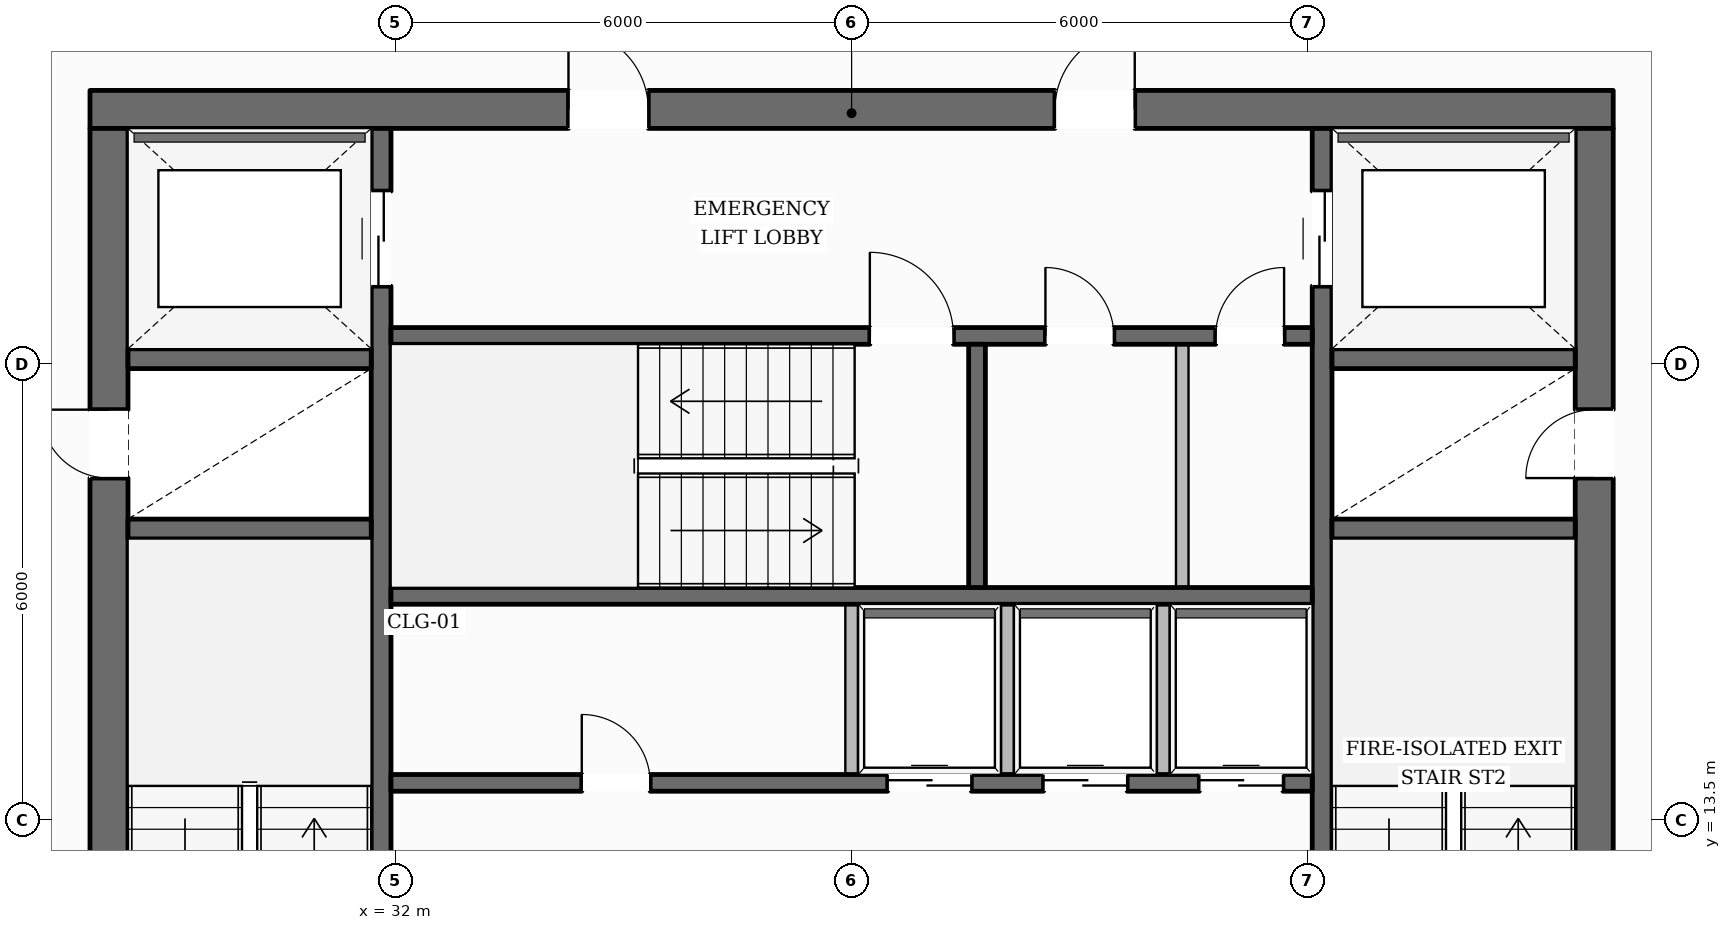
"""IFC4 building model, lengths in metres.
Left out: names, types, materials, properties, quantities, classifications, styles, units other than length and angle.
Written with IfcOpenShell. Run it as: python <this file> out.ifc"""

import sys

from ifc_helpers import new_model, si_unit, direction, frame, frame_2d, origin, place, context, subcontext, project, spatial, rectangle, extrude, element, fill, save


model = new_model("IFC4")
c1 = context("Model", 3, precision=1e-05, world=origin(), true_north=direction((0.0, 1.0)))
c2 = subcontext(c1, "Body", "Model", "MODEL_VIEW")
j1 = project(units=[si_unit("LENGTHUNIT", "METRE"), si_unit("PLANEANGLEUNIT", "RADIAN")], contexts=[c1])
p1 = place(None, origin())
s1 = spatial("IfcSite", under=j1, at=p1, CompositionType="ELEMENT")
p2 = place(p1, origin())
s2 = spatial("IfcBuilding", under=s1, at=p2, CompositionType="ELEMENT")
p3 = place(p2, frame((0.0, 0.0, 135.55)))
s3 = spatial("IfcBuildingStorey", under=s2, at=p3, CompositionType="ELEMENT", Elevation=135.55)
p4 = place(p3, frame((27.98, 22.85, 0.0), z_axis=(0.0, 0.0, 1.0), x_axis=(1.0, 0.0, 0.0)))
e1 = element("IfcWall", 1, at=p4, inside=s3, PredefinedType="SOLIDWALL", context=c2, shape_type="SweptSolid", body=[
    extrude(rectangle(XDim=20.04, YDim=0.5, at=frame_2d((10.02, 0.0))), origin(), (0.0, 0.0, 1.0), 3.6),
])
p5 = place(p4, frame((6.295, 0.0, 0.0)))
e2 = element("IfcOpeningElement", 2, at=p5, cuts=e1, PredefinedType="OPENING", context=c2, shape_type="SweptSolid", body=[
    extrude(rectangle(XDim=1.05, YDim=2.15, at=frame_2d((0.525, 1.075))), frame((0.0, 0.26, 0.0), z_axis=(0.0, -1.0, 0.0), x_axis=(1.0, 0.0, 0.0)), (0.0, 0.0, 1.0), 0.52),
])
p6 = place(p4, frame((12.695, 0.0, 0.0)))
e3 = element("IfcOpeningElement", 3, at=p6, cuts=e1, PredefinedType="OPENING", context=c2, shape_type="SweptSolid", body=[
    extrude(rectangle(XDim=1.05, YDim=2.15, at=frame_2d((0.525, 1.075))), frame((0.0, 0.26, 0.0), z_axis=(0.0, -1.0, 0.0), x_axis=(1.0, 0.0, 0.0)), (0.0, 0.0, 1.0), 0.52),
])
p7 = place(p3, frame((28.23, 9.6, 0.0), z_axis=(0.0, 0.0, 1.0), x_axis=(0.0, 1.0, 0.0)))
e4 = element("IfcWall", 4, at=p7, inside=s3, PredefinedType="SOLIDWALL", context=c2, shape_type="SweptSolid", body=[
    extrude(rectangle(XDim=13.0, YDim=0.5, at=frame_2d((6.5, 0.0))), origin(), (0.0, 0.0, 1.0), 3.6),
])
p8 = place(p7, frame((0.2, 0.0, 0.0)))
e5 = element("IfcOpeningElement", 5, at=p8, cuts=e4, PredefinedType="OPENING", context=c2, shape_type="SweptSolid", body=[
    extrude(rectangle(XDim=1.1, YDim=2.15, at=frame_2d((0.55, 1.075))), frame((0.0, 0.26, 0.0), z_axis=(0.0, -1.0, 0.0), x_axis=(1.0, 0.0, 0.0)), (0.0, 0.0, 1.0), 0.52),
])
p9 = place(p7, frame((8.4, 0.0, 0.0)))
e6 = element("IfcOpeningElement", 6, at=p9, cuts=e4, PredefinedType="OPENING", context=c2, shape_type="SweptSolid", body=[
    extrude(rectangle(XDim=0.9, YDim=2.1, at=frame_2d((0.45, 1.05))), frame((0.0, 0.26, 0.0), z_axis=(0.0, -1.0, 0.0), x_axis=(1.0, 0.0, 0.0)), (0.0, 0.0, 1.0), 0.52),
])
p10 = place(p3, frame((47.77, 9.6, 0.0), z_axis=(0.0, 0.0, 1.0), x_axis=(0.0, 1.0, 0.0)))
e7 = element("IfcWall", 7, at=p10, inside=s3, PredefinedType="SOLIDWALL", context=c2, shape_type="SweptSolid", body=[
    extrude(rectangle(XDim=13.0, YDim=0.5, at=frame_2d((6.5, 0.0))), origin(), (0.0, 0.0, 1.0), 3.6),
])
p11 = place(p10, frame((0.2, 0.0, 0.0)))
e8 = element("IfcOpeningElement", 8, at=p11, cuts=e7, PredefinedType="OPENING", context=c2, shape_type="SweptSolid", body=[
    extrude(rectangle(XDim=1.1, YDim=2.15, at=frame_2d((0.55, 1.075))), frame((0.0, 0.26, 0.0), z_axis=(0.0, -1.0, 0.0), x_axis=(1.0, 0.0, 0.0)), (0.0, 0.0, 1.0), 0.52),
])
p12 = place(p10, frame((8.4, 0.0, 0.0)))
e9 = element("IfcOpeningElement", 9, at=p12, cuts=e7, PredefinedType="OPENING", context=c2, shape_type="SweptSolid", body=[
    extrude(rectangle(XDim=0.9, YDim=2.1, at=frame_2d((0.45, 1.05))), frame((0.0, 0.26, 0.0), z_axis=(0.0, -1.0, 0.0), x_axis=(1.0, 0.0, 0.0)), (0.0, 0.0, 1.0), 0.52),
])
p13 = place(p3, frame((31.81, 9.6, 0.0), z_axis=(0.0, 0.0, 1.0), x_axis=(0.0, 1.0, 0.0)))
e10 = element("IfcWall", 10, at=p13, inside=s3, PredefinedType="SHEAR", context=c2, shape_type="SweptSolid", body=[
    extrude(rectangle(XDim=13.0, YDim=0.26, at=frame_2d((6.5, 0.0))), origin(), (0.0, 0.0, 1.0), 3.6),
])
p14 = place(p13, frame((10.925, 0.0, 0.0)))
e11 = element("IfcOpeningElement", 11, at=p14, cuts=e10, PredefinedType="OPENING", context=c2, shape_type="SweptSolid", body=[
    extrude(rectangle(XDim=1.25, YDim=2.25, at=frame_2d((0.625, 1.125))), frame((0.0, 0.14, 0.0), z_axis=(0.0, -1.0, 0.0), x_axis=(1.0, 0.0, 0.0)), (0.0, 0.0, 1.0), 0.28),
])
p15 = place(p3, frame((44.19, 9.6, 0.0), z_axis=(0.0, 0.0, 1.0), x_axis=(0.0, 1.0, 0.0)))
e12 = element("IfcWall", 12, at=p15, inside=s3, PredefinedType="SHEAR", context=c2, shape_type="SweptSolid", body=[
    extrude(rectangle(XDim=13.0, YDim=0.26, at=frame_2d((6.5, 0.0))), origin(), (0.0, 0.0, 1.0), 3.6),
])
p16 = place(p15, frame((10.925, 0.0, 0.0)))
e13 = element("IfcOpeningElement", 13, at=p16, cuts=e12, PredefinedType="OPENING", context=c2, shape_type="SweptSolid", body=[
    extrude(rectangle(XDim=1.25, YDim=2.25, at=frame_2d((0.625, 1.125))), frame((0.0, 0.14, 0.0), z_axis=(0.0, -1.0, 0.0), x_axis=(1.0, 0.0, 0.0)), (0.0, 0.0, 1.0), 0.28),
])
for number, where, z_axis, x_axis in (
    (14, (28.48, 17.33, 0.0), (0.0, 0.0, 1.0), (1.0, 0.0, 0.0)),
    (15, (28.48, 19.57, 0.0), (0.0, 0.0, 1.0), (1.0, 0.0, 0.0)),
    (16, (44.32, 17.33, 0.0), (0.0, 0.0, 1.0), (1.0, 0.0, 0.0)),
    (17, (44.32, 19.57, 0.0), (0.0, 0.0, 1.0), (1.0, 0.0, 0.0)),
):
    element("IfcWall", number, at=place(p3, frame(where, z_axis=z_axis, x_axis=x_axis)), inside=s3, PredefinedType="SHEAR", context=c2, shape_type="SweptSolid", body=[
        extrude(rectangle(XDim=3.2, YDim=0.26, at=frame_2d((1.6, 0.0))), origin(), (0.0, 0.0, 1.0), 3.6),
    ])
p17 = place(p3, frame((31.94, 19.87, 0.0), z_axis=(0.0, 0.0, 1.0), x_axis=(1.0, 0.0, 0.0)))
e18 = element("IfcWall", 18, at=p17, inside=s3, PredefinedType="SOLIDWALL", context=c2, shape_type="SweptSolid", body=[
    extrude(rectangle(XDim=12.12, YDim=0.22, at=frame_2d((6.06, 0.0))), origin(), (0.0, 0.0, 1.0), 3.6),
])
p18 = place(p17, frame((6.3, 0.0, 0.0)))
e19 = element("IfcOpeningElement", 19, at=p18, cuts=e18, PredefinedType="OPENING", context=c2, shape_type="SweptSolid", body=[
    extrude(rectangle(XDim=1.1, YDim=2.15, at=frame_2d((0.55, 1.075))), frame((0.0, 0.12, 0.0), z_axis=(0.0, -1.0, 0.0), x_axis=(1.0, 0.0, 0.0)), (0.0, 0.0, 1.0), 0.24),
])
p19 = place(p17, frame((8.61, 0.0, 0.0)))
e20 = element("IfcOpeningElement", 20, at=p19, cuts=e18, PredefinedType="OPENING", context=c2, shape_type="SweptSolid", body=[
    extrude(rectangle(XDim=0.9, YDim=2.1, at=frame_2d((0.45, 1.05))), frame((0.0, 0.12, 0.0), z_axis=(0.0, -1.0, 0.0), x_axis=(1.0, 0.0, 0.0)), (0.0, 0.0, 1.0), 0.24),
])
p20 = place(p17, frame((10.85, 0.0, 0.0)))
e21 = element("IfcOpeningElement", 21, at=p20, cuts=e18, PredefinedType="OPENING", context=c2, shape_type="SweptSolid", body=[
    extrude(rectangle(XDim=0.9, YDim=2.1, at=frame_2d((0.45, 1.05))), frame((0.0, 0.12, 0.0), z_axis=(0.0, -1.0, 0.0), x_axis=(1.0, 0.0, 0.0)), (0.0, 0.0, 1.0), 0.24),
])
p21 = place(p3, frame((31.94, 16.45, 0.0), z_axis=(0.0, 0.0, 1.0), x_axis=(1.0, 0.0, 0.0)))
e22 = element("IfcWall", 22, at=p21, inside=s3, PredefinedType="SOLIDWALL", context=c2, shape_type="SweptSolid", body=[
    extrude(rectangle(XDim=12.12, YDim=0.22, at=frame_2d((6.06, 0.0))), origin(), (0.0, 0.0, 1.0), 3.6),
])
p22 = place(p3, frame((39.65, 16.56, 0.0), z_axis=(0.0, 0.0, 1.0), x_axis=(0.0, 1.0, 0.0)))
e23 = element("IfcWall", 23, at=p22, inside=s3, PredefinedType="SOLIDWALL", context=c2, shape_type="SweptSolid", body=[
    extrude(rectangle(XDim=3.2, YDim=0.22, at=frame_2d((1.6, 0.0))), origin(), (0.0, 0.0, 1.0), 3.6),
])
p23 = place(p3, frame((31.94, 13.99, 0.0), z_axis=(0.0, 0.0, 1.0), x_axis=(1.0, 0.0, 0.0)))
e24 = element("IfcWall", 24, at=p23, inside=s3, PredefinedType="SOLIDWALL", context=c2, shape_type="SweptSolid", body=[
    extrude(rectangle(XDim=12.12, YDim=0.22, at=frame_2d((6.06, 0.0))), origin(), (0.0, 0.0, 1.0), 3.6),
])
p24 = place(p23, frame((2.51, 0.0, 0.0)))
e25 = element("IfcOpeningElement", 25, at=p24, cuts=e24, PredefinedType="OPENING", context=c2, shape_type="SweptSolid", body=[
    extrude(rectangle(XDim=0.9, YDim=2.1, at=frame_2d((0.45, 1.05))), frame((0.0, 0.12, 0.0), z_axis=(0.0, -1.0, 0.0), x_axis=(1.0, 0.0, 0.0)), (0.0, 0.0, 1.0), 0.24),
])
p25 = place(p23, frame((6.535, 0.0, 0.0)))
e26 = element("IfcOpeningElement", 26, at=p25, cuts=e24, PredefinedType="OPENING", context=c2, shape_type="SweptSolid", body=[
    extrude(rectangle(XDim=1.1, YDim=2.2, at=frame_2d((0.55, 1.1))), frame((0.0, 0.12, 0.0), z_axis=(0.0, -1.0, 0.0), x_axis=(1.0, 0.0, 0.0)), (0.0, 0.0, 1.0), 0.24),
])
p26 = place(p23, frame((8.585, 0.0, 0.0)))
e27 = element("IfcOpeningElement", 27, at=p26, cuts=e24, PredefinedType="OPENING", context=c2, shape_type="SweptSolid", body=[
    extrude(rectangle(XDim=1.1, YDim=2.2, at=frame_2d((0.55, 1.1))), frame((0.0, 0.12, 0.0), z_axis=(0.0, -1.0, 0.0), x_axis=(1.0, 0.0, 0.0)), (0.0, 0.0, 1.0), 0.24),
])
p27 = place(p23, frame((10.635, 0.0, 0.0)))
e28 = element("IfcOpeningElement", 28, at=p27, cuts=e24, PredefinedType="OPENING", context=c2, shape_type="SweptSolid", body=[
    extrude(rectangle(XDim=1.1, YDim=2.2, at=frame_2d((0.55, 1.1))), frame((0.0, 0.12, 0.0), z_axis=(0.0, -1.0, 0.0), x_axis=(1.0, 0.0, 0.0)), (0.0, 0.0, 1.0), 0.24),
])
p28 = place(p3, frame((13.349, 12.098, 0.0), z_axis=(0.0, 0.0, 1.0), x_axis=(0.506726076083, 0.862107118528, 0.0)))
e29 = element("IfcWall", 29, at=p28, inside=s3, PredefinedType="STANDARD", context=c2, shape_type="SweptSolid", body=[
    extrude(rectangle(XDim=37.522, YDim=0.38, at=frame_2d((18.761, 0.0))), origin(), (0.0, 0.0, 1.0), 3.059),
])
p29 = place(p28, frame((33.226, 0.0, 0.65)))
e30 = element("IfcOpeningElement", 30, at=p29, cuts=e29, PredefinedType="OPENING", context=c2, shape_type="SweptSolid", body=[
    extrude(rectangle(XDim=1.55, YDim=1.75, at=frame_2d((0.775, 0.875))), frame((0.0, 0.2, 0.0), z_axis=(0.0, -1.0, 0.0), x_axis=(1.0, 0.0, 0.0)), (0.0, 0.0, 1.0), 0.4),
])
p30 = place(p28, frame((27.131, 0.0, 0.65)))
e31 = element("IfcOpeningElement", 31, at=p30, cuts=e29, PredefinedType="OPENING", context=c2, shape_type="SweptSolid", body=[
    extrude(rectangle(XDim=1.55, YDim=1.75, at=frame_2d((0.775, 0.875))), frame((0.0, 0.2, 0.0), z_axis=(0.0, -1.0, 0.0), x_axis=(1.0, 0.0, 0.0)), (0.0, 0.0, 1.0), 0.4),
])
p31 = place(p28, frame((21.037, 0.0, 0.65)))
e32 = element("IfcOpeningElement", 32, at=p31, cuts=e29, PredefinedType="OPENING", context=c2, shape_type="SweptSolid", body=[
    extrude(rectangle(XDim=1.55, YDim=1.75, at=frame_2d((0.775, 0.875))), frame((0.0, 0.2, 0.0), z_axis=(0.0, -1.0, 0.0), x_axis=(1.0, 0.0, 0.0)), (0.0, 0.0, 1.0), 0.4),
])
p32 = place(p28, frame((8.848, 0.0, 0.65)))
e33 = element("IfcOpeningElement", 33, at=p32, cuts=e29, PredefinedType="OPENING", context=c2, shape_type="SweptSolid", body=[
    extrude(rectangle(XDim=1.55, YDim=1.75, at=frame_2d((0.775, 0.875))), frame((0.0, 0.2, 0.0), z_axis=(0.0, -1.0, 0.0), x_axis=(1.0, 0.0, 0.0)), (0.0, 0.0, 1.0), 0.4),
])
p33 = place(p28, frame((2.753, 0.0, 0.65)))
e34 = element("IfcOpeningElement", 34, at=p33, cuts=e29, PredefinedType="OPENING", context=c2, shape_type="SweptSolid", body=[
    extrude(rectangle(XDim=1.55, YDim=1.75, at=frame_2d((0.775, 0.875))), frame((0.0, 0.2, 0.0), z_axis=(0.0, -1.0, 0.0), x_axis=(1.0, 0.0, 0.0)), (0.0, 0.0, 1.0), 0.4),
])
p34 = place(p3, frame((43.578, 44.481, 0.0), z_axis=(0.0, 0.0, 1.0), x_axis=(0.504151594759, -0.863615174428, 0.0)))
e35 = element("IfcWall", 35, at=p34, inside=s3, PredefinedType="STANDARD", context=c2, shape_type="SweptSolid", body=[
    extrude(rectangle(XDim=37.328, YDim=0.38, at=frame_2d((18.664, 0.0))), origin(), (0.0, 0.0, 1.0), 3.059),
])
p35 = place(p34, frame((8.932, 0.0, 0.0)))
e36 = element("IfcOpeningElement", 36, at=p35, cuts=e35, PredefinedType="OPENING", context=c2, shape_type="SweptSolid", body=[
    extrude(rectangle(XDim=1.0, YDim=2.2, at=frame_2d((0.5, 1.1))), frame((0.0, 0.2, 0.0), z_axis=(0.0, -1.0, 0.0), x_axis=(1.0, 0.0, 0.0)), (0.0, 0.0, 1.0), 0.4),
])
p36 = place(p34, frame((33.041, 0.0, 0.65)))
e37 = element("IfcOpeningElement", 37, at=p36, cuts=e35, PredefinedType="OPENING", context=c2, shape_type="SweptSolid", body=[
    extrude(rectangle(XDim=1.55, YDim=1.75, at=frame_2d((0.775, 0.875))), frame((0.0, 0.2, 0.0), z_axis=(0.0, -1.0, 0.0), x_axis=(1.0, 0.0, 0.0)), (0.0, 0.0, 1.0), 0.4),
])
p37 = place(p34, frame((26.979, 0.0, 0.65)))
e38 = element("IfcOpeningElement", 38, at=p37, cuts=e35, PredefinedType="OPENING", context=c2, shape_type="SweptSolid", body=[
    extrude(rectangle(XDim=1.55, YDim=1.75, at=frame_2d((0.775, 0.875))), frame((0.0, 0.2, 0.0), z_axis=(0.0, -1.0, 0.0), x_axis=(1.0, 0.0, 0.0)), (0.0, 0.0, 1.0), 0.4),
])
p38 = place(p34, frame((20.917, 0.0, 0.65)))
e39 = element("IfcOpeningElement", 39, at=p38, cuts=e35, PredefinedType="OPENING", context=c2, shape_type="SweptSolid", body=[
    extrude(rectangle(XDim=1.55, YDim=1.75, at=frame_2d((0.775, 0.875))), frame((0.0, 0.2, 0.0), z_axis=(0.0, -1.0, 0.0), x_axis=(1.0, 0.0, 0.0)), (0.0, 0.0, 1.0), 0.4),
])
p39 = place(p34, frame((2.732, 0.0, 0.65)))
e40 = element("IfcOpeningElement", 40, at=p39, cuts=e35, PredefinedType="OPENING", context=c2, shape_type="SweptSolid", body=[
    extrude(rectangle(XDim=1.55, YDim=1.75, at=frame_2d((0.775, 0.875))), frame((0.0, 0.2, 0.0), z_axis=(0.0, -1.0, 0.0), x_axis=(1.0, 0.0, 0.0)), (0.0, 0.0, 1.0), 0.4),
])
for number, where, z_axis, x_axis in (
    (41, (38.0, 14.1, 0.0), (0.0, 0.0, 1.0), (0.0, 1.0, 0.0)),
    (42, (40.05, 14.1, 0.0), (0.0, 0.0, 1.0), (0.0, 1.0, 0.0)),
    (43, (42.1, 14.1, 0.0), (0.0, 0.0, 1.0), (0.0, 1.0, 0.0)),
):
    element("IfcWall", number, at=place(p3, frame(where, z_axis=z_axis, x_axis=x_axis)), inside=s3, PredefinedType="PARTITIONING", context=c2, shape_type="SweptSolid", body=[
        extrude(rectangle(XDim=2.24, YDim=0.165, at=frame_2d((1.12, 0.0))), origin(), (0.0, 0.0, 1.0), 3.6),
    ])
p40 = place(p3, frame((42.35, 16.56, 0.0), z_axis=(0.0, 0.0, 1.0), x_axis=(0.0, 1.0, 0.0)))
e44 = element("IfcWall", 44, at=p40, inside=s3, PredefinedType="PARTITIONING", context=c2, shape_type="SweptSolid", body=[
    extrude(rectangle(XDim=3.2, YDim=0.165, at=frame_2d((1.6, 0.0))), origin(), (0.0, 0.0, 1.0), 3.6),
])
p41 = place(p18, origin())
e45 = element("IfcDoor", 45, at=p41, inside=s3, OperationType="SINGLE_SWING_LEFT", PredefinedType="DOOR", context=c2, shape_type="SweptSolid", body=[
    extrude(rectangle(XDim=1.1, YDim=2.15, at=frame_2d((0.55, 1.075))), frame((0.0, 0.025, 0.0), z_axis=(0.0, -1.0, 0.0), x_axis=(1.0, 0.0, 0.0)), (0.0, 0.0, 1.0), 0.05),
])
fill(e19, e45)
p42 = place(p9, origin())
e46 = element("IfcDoor", 46, at=p42, inside=s3, OperationType="SINGLE_SWING_RIGHT", PredefinedType="DOOR", context=c2, shape_type="SweptSolid", body=[
    extrude(rectangle(XDim=0.9, YDim=2.1, at=frame_2d((0.45, 1.05))), frame((0.0, 0.025, 0.0), z_axis=(0.0, -1.0, 0.0), x_axis=(1.0, 0.0, 0.0)), (0.0, 0.0, 1.0), 0.05),
])
fill(e6, e46)
p43 = place(p12, origin())
e47 = element("IfcDoor", 47, at=p43, inside=s3, OperationType="SINGLE_SWING_LEFT", PredefinedType="DOOR", context=c2, shape_type="SweptSolid", body=[
    extrude(rectangle(XDim=0.9, YDim=2.1, at=frame_2d((0.45, 1.05))), frame((0.0, 0.025, 0.0), z_axis=(0.0, -1.0, 0.0), x_axis=(1.0, 0.0, 0.0)), (0.0, 0.0, 1.0), 0.05),
])
fill(e9, e47)
p44 = place(p5, origin())
e48 = element("IfcDoor", 48, at=p44, inside=s3, OperationType="SINGLE_SWING_LEFT", PredefinedType="DOOR", context=c2, shape_type="SweptSolid", body=[
    extrude(rectangle(XDim=1.05, YDim=2.15, at=frame_2d((0.525, 1.075))), frame((0.0, 0.025, 0.0), z_axis=(0.0, -1.0, 0.0), x_axis=(1.0, 0.0, 0.0)), (0.0, 0.0, 1.0), 0.05),
])
fill(e2, e48)
p45 = place(p6, origin())
e49 = element("IfcDoor", 49, at=p45, inside=s3, OperationType="SINGLE_SWING_RIGHT", PredefinedType="DOOR", context=c2, shape_type="SweptSolid", body=[
    extrude(rectangle(XDim=1.05, YDim=2.15, at=frame_2d((0.525, 1.075))), frame((0.0, 0.025, 0.0), z_axis=(0.0, -1.0, 0.0), x_axis=(1.0, 0.0, 0.0)), (0.0, 0.0, 1.0), 0.05),
])
fill(e3, e49)
p46 = place(p14, origin())
e50 = element("IfcDoor", 50, at=p46, inside=s3, OperationType="DOUBLE_DOOR_SLIDING", PredefinedType="DOOR", context=c2, shape_type="SweptSolid", body=[
    extrude(rectangle(XDim=1.25, YDim=2.25, at=frame_2d((0.625, 1.125))), frame((0.0, 0.025, 0.0), z_axis=(0.0, -1.0, 0.0), x_axis=(1.0, 0.0, 0.0)), (0.0, 0.0, 1.0), 0.05),
])
fill(e11, e50)
p47 = place(p16, origin())
e51 = element("IfcDoor", 51, at=p47, inside=s3, OperationType="DOUBLE_DOOR_SLIDING", PredefinedType="DOOR", context=c2, shape_type="SweptSolid", body=[
    extrude(rectangle(XDim=1.25, YDim=2.25, at=frame_2d((0.625, 1.125))), frame((0.0, 0.025, 0.0), z_axis=(0.0, -1.0, 0.0), x_axis=(1.0, 0.0, 0.0)), (0.0, 0.0, 1.0), 0.05),
])
fill(e13, e51)
p48 = place(p24, origin())
e52 = element("IfcDoor", 52, at=p48, inside=s3, OperationType="SINGLE_SWING_LEFT", PredefinedType="DOOR", context=c2, shape_type="SweptSolid", body=[
    extrude(rectangle(XDim=0.9, YDim=2.1, at=frame_2d((0.45, 1.05))), frame((0.0, 0.025, 0.0), z_axis=(0.0, -1.0, 0.0), x_axis=(1.0, 0.0, 0.0)), (0.0, 0.0, 1.0), 0.05),
])
fill(e25, e52)
p49 = place(p25, origin())
e53 = element("IfcDoor", 53, at=p49, inside=s3, OperationType="DOUBLE_DOOR_SLIDING", PredefinedType="DOOR", context=c2, shape_type="SweptSolid", body=[
    extrude(rectangle(XDim=1.1, YDim=2.2, at=frame_2d((0.55, 1.1))), frame((0.0, 0.025, 0.0), z_axis=(0.0, -1.0, 0.0), x_axis=(1.0, 0.0, 0.0)), (0.0, 0.0, 1.0), 0.05),
])
fill(e26, e53)
p50 = place(p26, origin())
e54 = element("IfcDoor", 54, at=p50, inside=s3, OperationType="DOUBLE_DOOR_SLIDING", PredefinedType="DOOR", context=c2, shape_type="SweptSolid", body=[
    extrude(rectangle(XDim=1.1, YDim=2.2, at=frame_2d((0.55, 1.1))), frame((0.0, 0.025, 0.0), z_axis=(0.0, -1.0, 0.0), x_axis=(1.0, 0.0, 0.0)), (0.0, 0.0, 1.0), 0.05),
])
fill(e27, e54)
p51 = place(p27, origin())
e55 = element("IfcDoor", 55, at=p51, inside=s3, OperationType="DOUBLE_DOOR_SLIDING", PredefinedType="DOOR", context=c2, shape_type="SweptSolid", body=[
    extrude(rectangle(XDim=1.1, YDim=2.2, at=frame_2d((0.55, 1.1))), frame((0.0, 0.025, 0.0), z_axis=(0.0, -1.0, 0.0), x_axis=(1.0, 0.0, 0.0)), (0.0, 0.0, 1.0), 0.05),
])
fill(e28, e55)
p52 = place(p19, origin())
e56 = element("IfcDoor", 56, at=p52, inside=s3, OperationType="SINGLE_SWING_LEFT", PredefinedType="DOOR", context=c2, shape_type="SweptSolid", body=[
    extrude(rectangle(XDim=0.9, YDim=2.1, at=frame_2d((0.45, 1.05))), frame((0.0, 0.025, 0.0), z_axis=(0.0, -1.0, 0.0), x_axis=(1.0, 0.0, 0.0)), (0.0, 0.0, 1.0), 0.05),
])
fill(e20, e56)
p53 = place(p20, origin())
e57 = element("IfcDoor", 57, at=p53, inside=s3, OperationType="SINGLE_SWING_RIGHT", PredefinedType="DOOR", context=c2, shape_type="SweptSolid", body=[
    extrude(rectangle(XDim=0.9, YDim=2.1, at=frame_2d((0.45, 1.05))), frame((0.0, 0.025, 0.0), z_axis=(0.0, -1.0, 0.0), x_axis=(1.0, 0.0, 0.0)), (0.0, 0.0, 1.0), 0.05),
])
fill(e21, e57)
save(model, sys.argv[1])
